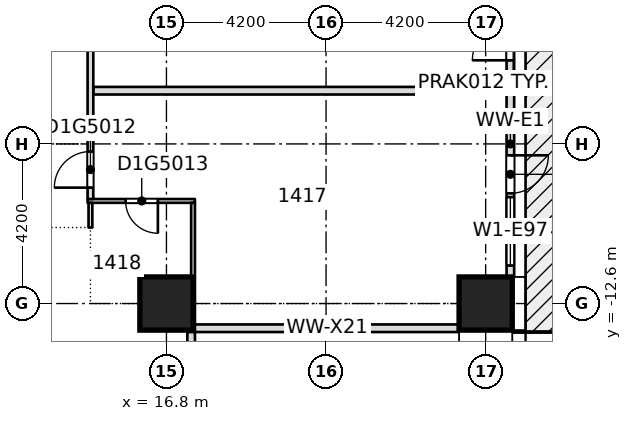
"""IFC4 building model, lengths in metres.
Left out: names, types, materials, properties, quantities, classifications, styles, units other than length and angle.
Written with IfcOpenShell. Run it as: python <this file> out.ifc"""

import sys

from ifc_helpers import new_model, si_unit, direction, frame, frame_2d, origin, origin_2d, place, context, subcontext, project, spatial, rectangle, extrude, element, fill, save


model = new_model("IFC4")
c1 = context("Model", 3, precision=1e-05, world=origin(), true_north=direction((0.0, 1.0)))
c2 = subcontext(c1, "Body", "Model", "MODEL_VIEW")
j1 = project(units=[si_unit("LENGTHUNIT", "METRE"), si_unit("PLANEANGLEUNIT", "RADIAN")], contexts=[c1])
p1 = place(None, origin())
s1 = spatial("IfcSite", under=j1, at=p1, CompositionType="ELEMENT")
p2 = place(p1, origin())
s2 = spatial("IfcBuilding", under=s1, at=p2, CompositionType="ELEMENT")
p3 = place(p2, frame((0.0, 0.0, 62.1)))
s3 = spatial("IfcBuildingStorey", under=s2, at=p3, CompositionType="ELEMENT", Elevation=62.1)
for number, where, z_axis, x_axis in (
    (1, (16.8, -12.6, -0.32), (0.0, 0.0, 1.0), (1.0, 0.0, 0.0)),
    (2, (25.2, -12.6, -0.32), (0.0, 0.0, 1.0), (1.0, 0.0, 0.0)),
):
    element("IfcColumn", number, at=place(p3, frame(where, z_axis=z_axis, x_axis=x_axis)), inside=s3, PredefinedType="COLUMN", context=c2, shape_type="SweptSolid", body=[
        extrude(rectangle(XDim=1.4, YDim=1.4, at=origin_2d()), origin(), (0.0, 0.0, 1.0), 3.45),
    ])
p4 = place(p3, frame((14.725, -9.9, 0.0), z_axis=(0.0, 0.0, 1.0), x_axis=(1.0, 0.0, 0.0)))
e3 = element("IfcWall", 3, at=p4, inside=s3, PredefinedType="PARTITIONING", context=c2, shape_type="SweptSolid", body=[
    extrude(rectangle(XDim=2.825, YDim=0.1, at=frame_2d((1.413, 0.0))), origin(), (0.0, 0.0, 1.0), 3.13),
])
p5 = place(p4, frame((1.0, 0.0, 0.0)))
e4 = element("IfcOpeningElement", 4, at=p5, cuts=e3, PredefinedType="OPENING", context=c2, shape_type="SweptSolid", body=[
    extrude(rectangle(XDim=0.85, YDim=2.1, at=frame_2d((0.425, 1.05))), frame((0.0, 0.06, 0.0), z_axis=(0.0, -1.0, 0.0), x_axis=(1.0, 0.0, 0.0)), (0.0, 0.0, 1.0), 0.12),
])
p6 = place(p3, frame((14.875, -7.0, 0.0), z_axis=(0.0, 0.0, 1.0), x_axis=(1.0, 0.0, 0.0)))
e5 = element("IfcWall", 5, at=p6, inside=s3, PredefinedType="PARTITIONING", context=c2, shape_type="SweptSolid", body=[
    extrude(rectangle(XDim=10.875, YDim=0.2, at=frame_2d((5.438, 0.0))), origin(), (0.0, 0.0, 1.0), 3.13),
])
p7 = place(p3, frame((14.8, -10.6, 0.0), z_axis=(0.0, 0.0, 1.0), x_axis=(0.0, 1.0, 0.0)))
e6 = element("IfcWall", 6, at=p7, inside=s3, PredefinedType="PARTITIONING", context=c2, shape_type="SweptSolid", body=[
    extrude(rectangle(XDim=0.65, YDim=0.1, at=frame_2d((0.325, 0.0))), origin(), (0.0, 0.0, 1.0), 3.13),
])
p8 = place(p3, frame((14.8, -9.85, 0.0), z_axis=(0.0, 0.0, 1.0), x_axis=(0.0, 1.0, 0.0)))
e7 = element("IfcWall", 7, at=p8, inside=s3, PredefinedType="PARTITIONING", context=c2, shape_type="SweptSolid", body=[
    extrude(rectangle(XDim=18.175, YDim=0.15, at=frame_2d((9.087, 0.0))), origin(), (0.0, 0.0, 1.0), 3.13),
])
p9 = place(p8, frame((0.3, 0.0, 0.0)))
e8 = element("IfcOpeningElement", 8, at=p9, cuts=e7, PredefinedType="OPENING", context=c2, shape_type="SweptSolid", body=[
    extrude(rectangle(XDim=0.95, YDim=2.1, at=frame_2d((0.475, 1.05))), frame((0.0, 0.085, 0.0), z_axis=(0.0, -1.0, 0.0), x_axis=(1.0, 0.0, 0.0)), (0.0, 0.0, 1.0), 0.17),
])
p10 = place(p8, frame((9.3, 0.0, 0.0)))
e9 = element("IfcOpeningElement", 9, at=p10, cuts=e7, PredefinedType="OPENING", context=c2, shape_type="SweptSolid", body=[
    extrude(rectangle(XDim=1.1, YDim=2.1, at=frame_2d((0.55, 1.05))), frame((0.0, 0.085, 0.0), z_axis=(0.0, -1.0, 0.0), x_axis=(1.0, 0.0, 0.0)), (0.0, 0.0, 1.0), 0.17),
])
p11 = place(p8, frame((4.05, 0.0, 0.0)))
e10 = element("IfcOpeningElement", 10, at=p11, cuts=e7, PredefinedType="OPENING", context=c2, shape_type="SweptSolid", body=[
    extrude(rectangle(XDim=1.0, YDim=2.1, at=frame_2d((0.5, 1.05))), frame((0.0, 0.085, 0.0), z_axis=(0.0, -1.0, 0.0), x_axis=(1.0, 0.0, 0.0)), (0.0, 0.0, 1.0), 0.17),
])
p12 = place(p3, frame((17.5, -13.35, 0.0), z_axis=(0.0, 0.0, 1.0), x_axis=(0.0, 1.0, 0.0)))
e11 = element("IfcWall", 11, at=p12, inside=s3, PredefinedType="PARTITIONING", context=c2, shape_type="SweptSolid", body=[
    extrude(rectangle(XDim=3.4, YDim=0.1, at=frame_2d((1.7, 0.0))), origin(), (0.0, 0.0, 1.0), 3.13),
])
p13 = place(p3, frame((17.45, -20.3, 0.0), z_axis=(0.0, 0.0, 1.0), x_axis=(0.0, 1.0, 0.0)))
e12 = element("IfcWall", 12, at=p13, inside=s3, PredefinedType="STANDARD", context=c2, shape_type="SweptSolid", body=[
    extrude(rectangle(XDim=6.95, YDim=0.2, at=frame_2d((3.475, 0.0))), origin(), (0.0, 0.0, 1.0), 3.13),
])
p14 = place(p13, frame((0.3, 0.0, 0.2)))
e13 = element("IfcOpeningElement", 13, at=p14, cuts=e12, PredefinedType="OPENING", context=c2, shape_type="SweptSolid", body=[
    extrude(rectangle(XDim=1.8, YDim=2.65, at=frame_2d((0.9, 1.325))), frame((0.0, 0.11, 0.0), z_axis=(0.0, -1.0, 0.0), x_axis=(1.0, 0.0, 0.0)), (0.0, 0.0, 1.0), 0.22),
])
p15 = place(p13, frame((3.775, 0.0, 0.2)))
e14 = element("IfcOpeningElement", 14, at=p15, cuts=e12, PredefinedType="OPENING", context=c2, shape_type="SweptSolid", body=[
    extrude(rectangle(XDim=1.8, YDim=2.65, at=frame_2d((0.9, 1.325))), frame((0.0, 0.11, 0.0), z_axis=(0.0, -1.0, 0.0), x_axis=(1.0, 0.0, 0.0)), (0.0, 0.0, 1.0), 0.22),
])
p16 = place(p3, frame((17.55, -13.25, 0.0), z_axis=(0.0, 0.0, 1.0), x_axis=(1.0, 0.0, 0.0)))
e15 = element("IfcWall", 15, at=p16, inside=s3, PredefinedType="STANDARD", context=c2, shape_type="SweptSolid", body=[
    extrude(rectangle(XDim=6.95, YDim=0.2, at=frame_2d((3.475, 0.0))), origin(), (0.0, 0.0, 1.0), 3.13),
])
p17 = place(p3, frame((25.85, -11.9, 0.0), z_axis=(0.0, 0.0, 1.0), x_axis=(0.0, 1.0, 0.0)))
e16 = element("IfcWall", 16, at=p17, inside=s3, PredefinedType="STANDARD", context=c2, shape_type="SweptSolid", body=[
    extrude(rectangle(XDim=7.0, YDim=0.2, at=frame_2d((3.5, 0.0))), origin(), (0.0, 0.0, 1.0), 3.13),
])
p18 = place(p17, frame((0.3, 0.0, 0.2)))
e17 = element("IfcOpeningElement", 17, at=p18, cuts=e16, PredefinedType="OPENING", context=c2, shape_type="SweptSolid", body=[
    extrude(rectangle(XDim=1.8, YDim=2.65, at=frame_2d((0.9, 1.325))), frame((0.0, 0.11, 0.0), z_axis=(0.0, -1.0, 0.0), x_axis=(1.0, 0.0, 0.0)), (0.0, 0.0, 1.0), 0.22),
])
p19 = place(p17, frame((2.2, 0.0, 0.0)))
e18 = element("IfcOpeningElement", 18, at=p19, cuts=e16, PredefinedType="OPENING", context=c2, shape_type="SweptSolid", body=[
    extrude(rectangle(XDim=1.0, YDim=2.4, at=frame_2d((0.5, 1.2))), frame((0.0, 0.11, 0.0), z_axis=(0.0, -1.0, 0.0), x_axis=(1.0, 0.0, 0.0)), (0.0, 0.0, 1.0), 0.22),
])
p20 = place(p17, frame((5.7, 0.0, 0.0)))
e19 = element("IfcOpeningElement", 19, at=p20, cuts=e16, PredefinedType="OPENING", context=c2, shape_type="SweptSolid", body=[
    extrude(rectangle(XDim=1.0, YDim=2.4, at=frame_2d((0.5, 1.2))), frame((0.0, 0.11, 0.0), z_axis=(0.0, -1.0, 0.0), x_axis=(1.0, 0.0, 0.0)), (0.0, 0.0, 1.0), 0.22),
])
p21 = place(p9, origin())
e20 = element("IfcDoor", 20, at=p21, inside=s3, OperationType="SINGLE_SWING_RIGHT", PredefinedType="DOOR", context=c2, shape_type="SweptSolid", body=[
    extrude(rectangle(XDim=0.95, YDim=2.1, at=frame_2d((0.475, 1.05))), frame((0.0, 0.025, 0.0), z_axis=(0.0, -1.0, 0.0), x_axis=(1.0, 0.0, 0.0)), (0.0, 0.0, 1.0), 0.05),
])
fill(e8, e20)
p22 = place(p5, origin())
e21 = element("IfcDoor", 21, at=p22, inside=s3, OperationType="SINGLE_SWING_RIGHT", PredefinedType="DOOR", context=c2, shape_type="SweptSolid", body=[
    extrude(rectangle(XDim=0.85, YDim=2.1, at=frame_2d((0.425, 1.05))), frame((0.0, 0.025, 0.0), z_axis=(0.0, -1.0, 0.0), x_axis=(1.0, 0.0, 0.0)), (0.0, 0.0, 1.0), 0.05),
])
fill(e4, e21)
p23 = place(p18, origin())
e22 = element("IfcWindow", 22, at=p23, inside=s3, PartitioningType="SINGLE_PANEL", PredefinedType="WINDOW", context=c2, shape_type="SweptSolid", body=[
    extrude(rectangle(XDim=1.8, YDim=2.65, at=frame_2d((0.9, 1.325))), frame((0.0, 0.03, 0.0), z_axis=(0.0, -1.0, 0.0), x_axis=(1.0, 0.0, 0.0)), (0.0, 0.0, 1.0), 0.06),
])
fill(e17, e22)
p24 = place(p19, origin())
e23 = element("IfcDoor", 23, at=p24, inside=s3, OperationType="SINGLE_SWING_LEFT", PredefinedType="DOOR", context=c2, shape_type="SweptSolid", body=[
    extrude(rectangle(XDim=1.0, YDim=2.4, at=frame_2d((0.5, 1.2))), frame((0.0, 0.025, 0.0), z_axis=(0.0, -1.0, 0.0), x_axis=(1.0, 0.0, 0.0)), (0.0, 0.0, 1.0), 0.05),
])
fill(e18, e23)
p25 = place(p20, origin())
e24 = element("IfcDoor", 24, at=p25, inside=s3, OperationType="SINGLE_SWING_LEFT", PredefinedType="DOOR", context=c2, shape_type="SweptSolid", body=[
    extrude(rectangle(XDim=1.0, YDim=2.4, at=frame_2d((0.5, 1.2))), frame((0.0, 0.025, 0.0), z_axis=(0.0, -1.0, 0.0), x_axis=(1.0, 0.0, 0.0)), (0.0, 0.0, 1.0), 0.05),
])
fill(e19, e24)
save(model, sys.argv[1])
